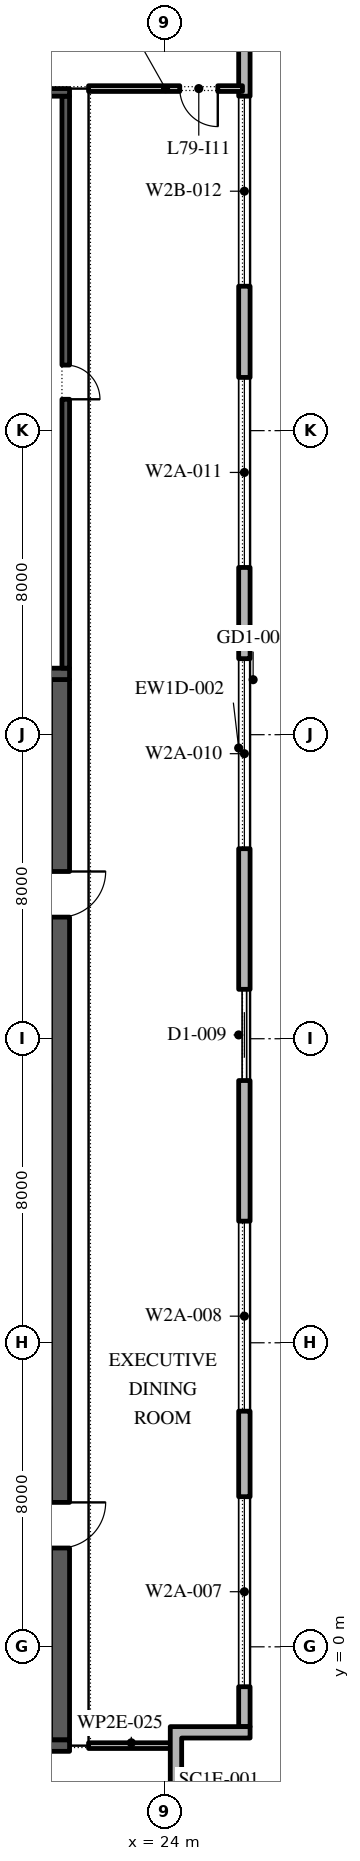
"""IFC4 building model, lengths in metres.
Left out: names, types, materials, properties, quantities, classifications, styles, units other than length and angle.
Written with IfcOpenShell. Run it as: python <this file> out.ifc"""

import sys

from ifc_helpers import new_model, si_unit, direction, frame, frame_2d, origin, place, context, subcontext, project, spatial, polyline, rectangle, outline, extrude, element, fill, save


model = new_model("IFC4")
c1 = context("Model", 3, precision=1e-05, world=origin(), true_north=direction((0.0, 1.0)))
c2 = subcontext(c1, "Body", "Model", "MODEL_VIEW")
j1 = project(units=[si_unit("LENGTHUNIT", "METRE"), si_unit("PLANEANGLEUNIT", "RADIAN")], contexts=[c1])
p1 = place(None, origin())
s1 = spatial("IfcSite", under=j1, at=p1, CompositionType="ELEMENT")
p2 = place(p1, origin())
s2 = spatial("IfcBuilding", under=s1, at=p2, CompositionType="ELEMENT")
p3 = place(p2, frame((0.0, 0.0, 359.4)))
s3 = spatial("IfcBuildingStorey", under=s2, at=p3, CompositionType="ELEMENT", Elevation=359.4)
p4 = place(p3, frame((26.1, -2.1, 0.0), z_axis=(0.0, 0.0, 1.0), x_axis=(0.0, 1.0, 0.0)))
e1 = element("IfcWall", 1, at=p4, inside=s3, PredefinedType="STANDARD", context=c2, shape_type="SweptSolid", body=[
    extrude(rectangle(XDim=51.5, YDim=0.3, at=frame_2d((25.75, 0.0))), origin(), (0.0, 0.0, 1.0), 3.9),
])
p5 = place(p4, frame((1.05, 0.0, 0.45)))
e2 = element("IfcOpeningElement", 2, at=p5, cuts=e1, PredefinedType="OPENING", context=c2, shape_type="SweptSolid", body=[
    extrude(rectangle(XDim=5.0, YDim=2.95, at=frame_2d((2.5, 1.475))), frame((0.0, 0.16, 0.0), z_axis=(0.0, -1.0, 0.0), x_axis=(1.0, 0.0, 0.0)), (0.0, 0.0, 1.0), 0.32),
])
p6 = place(p4, frame((8.3, 0.0, 0.45)))
e3 = element("IfcOpeningElement", 3, at=p6, cuts=e1, PredefinedType="OPENING", context=c2, shape_type="SweptSolid", body=[
    extrude(rectangle(XDim=5.0, YDim=2.95, at=frame_2d((2.5, 1.475))), frame((0.0, 0.16, 0.0), z_axis=(0.0, -1.0, 0.0), x_axis=(1.0, 0.0, 0.0)), (0.0, 0.0, 1.0), 0.32),
])
p7 = place(p4, frame((17.0, 0.0, 0.0)))
e4 = element("IfcOpeningElement", 4, at=p7, cuts=e1, PredefinedType="OPENING", context=c2, shape_type="SweptSolid", body=[
    extrude(rectangle(XDim=2.4, YDim=3.5, at=frame_2d((1.2, 1.75))), frame((0.0, 0.16, 0.0), z_axis=(0.0, -1.0, 0.0), x_axis=(1.0, 0.0, 0.0)), (0.0, 0.0, 1.0), 0.32),
])
p8 = place(p4, frame((23.1, 0.0, 0.45)))
e5 = element("IfcOpeningElement", 5, at=p8, cuts=e1, PredefinedType="OPENING", context=c2, shape_type="SweptSolid", body=[
    extrude(rectangle(XDim=5.0, YDim=2.95, at=frame_2d((2.5, 1.475))), frame((0.0, 0.16, 0.0), z_axis=(0.0, -1.0, 0.0), x_axis=(1.0, 0.0, 0.0)), (0.0, 0.0, 1.0), 0.32),
])
p9 = place(p4, frame((30.5, 0.0, 0.45)))
e6 = element("IfcOpeningElement", 6, at=p9, cuts=e1, PredefinedType="OPENING", context=c2, shape_type="SweptSolid", body=[
    extrude(rectangle(XDim=5.0, YDim=2.95, at=frame_2d((2.5, 1.475))), frame((0.0, 0.16, 0.0), z_axis=(0.0, -1.0, 0.0), x_axis=(1.0, 0.0, 0.0)), (0.0, 0.0, 1.0), 0.32),
])
p10 = place(p4, frame((37.9, 0.0, 0.45)))
e7 = element("IfcOpeningElement", 7, at=p10, cuts=e1, PredefinedType="OPENING", context=c2, shape_type="SweptSolid", body=[
    extrude(rectangle(XDim=5.0, YDim=2.9, at=frame_2d((2.5, 1.45))), frame((0.0, 0.16, 0.0), z_axis=(0.0, -1.0, 0.0), x_axis=(1.0, 0.0, 0.0)), (0.0, 0.0, 1.0), 0.32),
])
p11 = place(p4, frame((46.6, 0.0, 0.0)))
e8 = element("IfcOpeningElement", 8, at=p11, cuts=e1, PredefinedType="OPENING", context=c2, shape_type="SweptSolid", body=[
    extrude(rectangle(XDim=2.4, YDim=3.5, at=frame_2d((1.2, 1.75))), frame((0.0, 0.16, 0.0), z_axis=(0.0, -1.0, 0.0), x_axis=(1.0, 0.0, 0.0)), (0.0, 0.0, 1.0), 0.32),
])
p12 = place(p3, origin())
e9 = element("IfcWall", 9, at=p12, inside=s3, PredefinedType="STANDARD", context=c2, shape_type="SweptSolid", body=[
    extrude(outline(polyline([(24.15, -3.9), (24.15, -2.1), (26.25, -2.1), (26.25, -2.4), (24.45, -2.4), (24.45, -4.2), (22.65, -4.2), (22.65, -5.7), (22.35, -5.7), (22.35, -3.9), (24.15, -3.9)])), origin(), (0.0, 0.0, 1.0), 3.9),
])
p13 = place(p3, frame((21.25, -2.45, 0.0), z_axis=(0.0, 0.0, 1.0), x_axis=(0.0, 1.0, 0.0)))
e10 = element("IfcWall", 10, at=p13, inside=s3, PredefinedType="SHEAR", context=c2, shape_type="SweptSolid", body=[
    extrude(rectangle(XDim=27.9, YDim=0.5, at=frame_2d((13.95, 0.0))), origin(), (0.0, 0.0, 1.0), 3.9),
])
p14 = place(p13, frame((5.05, 0.0, 0.0)))
e11 = element("IfcOpeningElement", 11, at=p14, cuts=e10, PredefinedType="OPENING", context=c2, shape_type="SweptSolid", body=[
    extrude(rectangle(XDim=1.2, YDim=2.1, at=frame_2d((0.6, 1.05))), frame((0.0, 0.26, 0.0), z_axis=(0.0, -1.0, 0.0), x_axis=(1.0, 0.0, 0.0)), (0.0, 0.0, 1.0), 0.52),
])
p15 = place(p13, frame((21.65, 0.0, 0.0)))
e12 = element("IfcOpeningElement", 12, at=p15, cuts=e10, PredefinedType="OPENING", context=c2, shape_type="SweptSolid", body=[
    extrude(rectangle(XDim=1.2, YDim=2.1, at=frame_2d((0.6, 1.05))), frame((0.0, 0.26, 0.0), z_axis=(0.0, -1.0, 0.0), x_axis=(1.0, 0.0, 0.0)), (0.0, 0.0, 1.0), 0.52),
])
for number, where, z_axis, x_axis in (
    (13, (10.5, -2.6, 0.0), (0.0, 0.0, 1.0), (1.0, 0.0, 0.0)),
    (14, (10.5, 25.6, 0.0), (0.0, 0.0, 1.0), (1.0, 0.0, 0.0)),
):
    element("IfcWall", number, at=place(p3, frame(where, z_axis=z_axis, x_axis=x_axis)), inside=s3, PredefinedType="SHEAR", context=c2, shape_type="SweptSolid", body=[
        extrude(rectangle(XDim=11.0, YDim=0.3, at=frame_2d((5.5, 0.0))), origin(), (0.0, 0.0, 1.0), 3.9),
    ])
p16 = place(p3, frame((21.4, 25.75, 0.0), z_axis=(0.0, 0.0, 1.0), x_axis=(0.0, 1.0, 0.0)))
e15 = element("IfcWall", 15, at=p16, inside=s3, PredefinedType="SHEAR", context=c2, shape_type="SweptSolid", body=[
    extrude(rectangle(XDim=15.05, YDim=0.2, at=frame_2d((7.525, 0.0))), origin(), (0.0, 0.0, 1.0), 3.9),
])
p17 = place(p16, frame((7.075, 0.0, 0.0)))
e16 = element("IfcOpeningElement", 16, at=p17, cuts=e15, PredefinedType="OPENING", context=c2, shape_type="SweptSolid", body=[
    extrude(rectangle(XDim=0.9, YDim=2.1, at=frame_2d((0.45, 1.05))), frame((0.0, 0.11, 0.0), z_axis=(0.0, -1.0, 0.0), x_axis=(1.0, 0.0, 0.0)), (0.0, 0.0, 1.0), 0.22),
])
p18 = place(p3, frame((10.5, 40.9, 0.0), z_axis=(0.0, 0.0, 1.0), x_axis=(1.0, 0.0, 0.0)))
e17 = element("IfcWall", 17, at=p18, inside=s3, PredefinedType="SHEAR", context=c2, shape_type="SweptSolid", body=[
    extrude(rectangle(XDim=11.0, YDim=0.2, at=frame_2d((5.5, 0.0))), origin(), (0.0, 0.0, 1.0), 3.9),
])
p19 = place(p3, frame((22.0, -2.6, 0.0), z_axis=(0.0, 0.0, 1.0), x_axis=(1.0, 0.0, 0.0)))
e18 = element("IfcWall", 18, at=p19, inside=s3, PredefinedType="PARTITIONING", context=c2, shape_type="SweptSolid", body=[
    extrude(rectangle(XDim=2.25, YDim=0.15, at=frame_2d((1.125, 0.0))), origin(), (0.0, 0.0, 1.0), 3.9),
])
p20 = place(p3, frame((26.05, 41.0, 0.0), z_axis=(0.0, 0.0, 1.0), x_axis=(-1.0, 0.0, 0.0)))
e19 = element("IfcWall", 19, at=p20, inside=s3, PredefinedType="PARTITIONING", context=c2, shape_type="SweptSolid", body=[
    extrude(rectangle(XDim=4.05, YDim=0.15, at=frame_2d((2.025, 0.0))), origin(), (0.0, 0.0, 1.0), 3.9),
])
p21 = place(p20, frame((0.65, 0.0, 0.0)))
e20 = element("IfcOpeningElement", 20, at=p21, cuts=e19, PredefinedType="OPENING", context=c2, shape_type="SweptSolid", body=[
    extrude(rectangle(XDim=1.0, YDim=2.1, at=frame_2d((0.5, 1.05))), frame((0.0, 0.085, 0.0), z_axis=(0.0, -1.0, 0.0), x_axis=(1.0, 0.0, 0.0)), (0.0, 0.0, 1.0), 0.17),
])
p22 = place(p5, origin())
e21 = element("IfcWindow", 21, at=p22, inside=s3, PartitioningType="DOUBLE_PANEL_VERTICAL", PredefinedType="WINDOW", context=c2, shape_type="SweptSolid", body=[
    extrude(rectangle(XDim=5.0, YDim=2.95, at=frame_2d((2.5, 1.475))), frame((0.0, 0.03, 0.0), z_axis=(0.0, -1.0, 0.0), x_axis=(1.0, 0.0, 0.0)), (0.0, 0.0, 1.0), 0.06),
])
fill(e2, e21)
p23 = place(p6, origin())
e22 = element("IfcWindow", 22, at=p23, inside=s3, PartitioningType="DOUBLE_PANEL_VERTICAL", PredefinedType="WINDOW", context=c2, shape_type="SweptSolid", body=[
    extrude(rectangle(XDim=5.0, YDim=2.95, at=frame_2d((2.5, 1.475))), frame((0.0, 0.03, 0.0), z_axis=(0.0, -1.0, 0.0), x_axis=(1.0, 0.0, 0.0)), (0.0, 0.0, 1.0), 0.06),
])
fill(e3, e22)
p24 = place(p7, origin())
e23 = element("IfcDoor", 23, at=p24, inside=s3, OperationType="DOUBLE_DOOR_SLIDING", PredefinedType="DOOR", context=c2, shape_type="SweptSolid", body=[
    extrude(rectangle(XDim=2.4, YDim=3.5, at=frame_2d((1.2, 1.75))), frame((0.0, 0.025, 0.0), z_axis=(0.0, -1.0, 0.0), x_axis=(1.0, 0.0, 0.0)), (0.0, 0.0, 1.0), 0.05),
])
fill(e4, e23)
p25 = place(p8, origin())
e24 = element("IfcWindow", 24, at=p25, inside=s3, PartitioningType="DOUBLE_PANEL_VERTICAL", PredefinedType="WINDOW", context=c2, shape_type="SweptSolid", body=[
    extrude(rectangle(XDim=5.0, YDim=2.95, at=frame_2d((2.5, 1.475))), frame((0.0, 0.03, 0.0), z_axis=(0.0, -1.0, 0.0), x_axis=(1.0, 0.0, 0.0)), (0.0, 0.0, 1.0), 0.06),
])
fill(e5, e24)
p26 = place(p9, origin())
e25 = element("IfcWindow", 25, at=p26, inside=s3, PartitioningType="DOUBLE_PANEL_VERTICAL", PredefinedType="WINDOW", context=c2, shape_type="SweptSolid", body=[
    extrude(rectangle(XDim=5.0, YDim=2.95, at=frame_2d((2.5, 1.475))), frame((0.0, 0.03, 0.0), z_axis=(0.0, -1.0, 0.0), x_axis=(1.0, 0.0, 0.0)), (0.0, 0.0, 1.0), 0.06),
])
fill(e6, e25)
p27 = place(p10, origin())
e26 = element("IfcWindow", 26, at=p27, inside=s3, PartitioningType="DOUBLE_PANEL_VERTICAL", PredefinedType="WINDOW", context=c2, shape_type="SweptSolid", body=[
    extrude(rectangle(XDim=5.0, YDim=2.9, at=frame_2d((2.5, 1.45))), frame((0.0, 0.03, 0.0), z_axis=(0.0, -1.0, 0.0), x_axis=(1.0, 0.0, 0.0)), (0.0, 0.0, 1.0), 0.06),
])
fill(e7, e26)
p28 = place(p14, frame((1.2, 0.0, 0.0), z_axis=(0.0, 0.0, 1.0), x_axis=(-1.0, 0.0, 0.0)))
e27 = element("IfcDoor", 27, at=p28, inside=s3, OperationType="SINGLE_SWING_RIGHT", PredefinedType="DOOR", context=c2, shape_type="SweptSolid", body=[
    extrude(rectangle(XDim=1.2, YDim=2.1, at=frame_2d((0.6, 1.05))), frame((0.0, 0.025, 0.0), z_axis=(0.0, -1.0, 0.0), x_axis=(1.0, 0.0, 0.0)), (0.0, 0.0, 1.0), 0.05),
])
fill(e11, e27)
p29 = place(p15, frame((1.2, 0.0, 0.0), z_axis=(0.0, 0.0, 1.0), x_axis=(-1.0, 0.0, 0.0)))
e28 = element("IfcDoor", 28, at=p29, inside=s3, OperationType="SINGLE_SWING_RIGHT", PredefinedType="DOOR", context=c2, shape_type="SweptSolid", body=[
    extrude(rectangle(XDim=1.2, YDim=2.1, at=frame_2d((0.6, 1.05))), frame((0.0, 0.025, 0.0), z_axis=(0.0, -1.0, 0.0), x_axis=(1.0, 0.0, 0.0)), (0.0, 0.0, 1.0), 0.05),
])
fill(e12, e28)
p30 = place(p17, frame((0.9, 0.15, 0.0), z_axis=(0.0, 0.0, 1.0), x_axis=(-1.0, 0.0, 0.0)))
e29 = element("IfcDoor", 29, at=p30, inside=s3, OperationType="SINGLE_SWING_LEFT", PredefinedType="DOOR", context=c2, shape_type="SweptSolid", body=[
    extrude(rectangle(XDim=0.9, YDim=2.1, at=frame_2d((0.45, 1.05))), frame((0.0, 0.1, 0.0), z_axis=(0.0, -1.0, 0.0), x_axis=(1.0, 0.0, 0.0)), (0.0, 0.0, 1.0), 0.05),
])
fill(e16, e29)
p31 = place(p21, origin())
e30 = element("IfcDoor", 30, at=p31, inside=s3, OperationType="SINGLE_SWING_RIGHT", PredefinedType="DOOR", context=c2, shape_type="SweptSolid", body=[
    extrude(rectangle(XDim=1.0, YDim=2.1, at=frame_2d((0.5, 1.05))), frame((0.0, 0.025, 0.0), z_axis=(0.0, -1.0, 0.0), x_axis=(1.0, 0.0, 0.0)), (0.0, 0.0, 1.0), 0.05),
])
fill(e20, e30)
save(model, sys.argv[1])
